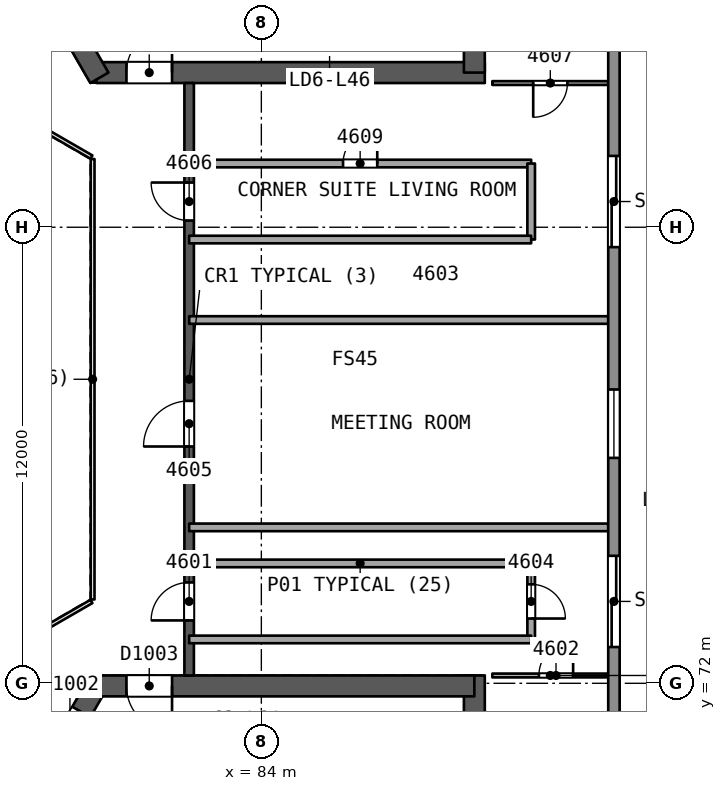
"""IFC4 building model, lengths in metres.
Left out: names, types, materials, properties, quantities, classifications, styles, units other than length and angle.
Written with IfcOpenShell. Run it as: python <this file> out.ifc"""

import sys

from ifc_helpers import new_model, si_unit, direction, frame, frame_2d, origin, place, context, subcontext, project, spatial, rectangle, extrude, element, fill, save


model = new_model("IFC4")
c1 = context("Model", 3, precision=1e-05, world=origin(), true_north=direction((0.0, 1.0)))
c2 = subcontext(c1, "Body", "Model", "MODEL_VIEW")
j1 = project(units=[si_unit("LENGTHUNIT", "METRE"), si_unit("PLANEANGLEUNIT", "RADIAN")], contexts=[c1])
p1 = place(None, origin())
s1 = spatial("IfcSite", under=j1, at=p1, CompositionType="ELEMENT")
p2 = place(p1, origin())
s2 = spatial("IfcBuilding", under=s1, at=p2, CompositionType="ELEMENT")
p3 = place(p2, frame((0.0, 0.0, 189.6)))
s3 = spatial("IfcBuildingStorey", under=s2, at=p3, CompositionType="ELEMENT", Elevation=189.6)
p4 = place(p3, frame((79.659, 88.069, 0.0), z_axis=(0.0, 0.0, 1.0), x_axis=(1.0, 0.0, 0.0)))
e1 = element("IfcWall", 1, at=p4, inside=s3, PredefinedType="SHEAR", context=c2, shape_type="SweptSolid", body=[
    extrude(rectangle(XDim=10.221, YDim=0.55, at=frame_2d((5.111, 0.0))), origin(), (0.0, 0.0, 1.0), 3.7),
])
p5 = place(p4, frame((0.791, 0.0, 0.0)))
e2 = element("IfcOpeningElement", 2, at=p5, cuts=e1, PredefinedType="OPENING", context=c2, shape_type="SweptSolid", body=[
    extrude(rectangle(XDim=1.2, YDim=2.1, at=frame_2d((0.6, 1.05))), frame((0.0, 0.286, 0.0), z_axis=(0.0, -1.0, 0.0), x_axis=(1.0, 0.0, 0.0)), (0.0, 0.0, 1.0), 0.571),
])
p6 = place(p3, frame((89.605, 88.069, 0.0), z_axis=(0.0, 0.0, 1.0), x_axis=(0.0, 1.0, 0.0)))
e3 = element("IfcWall", 3, at=p6, inside=s3, PredefinedType="SHEAR", context=c2, shape_type="SweptSolid", body=[
    extrude(rectangle(XDim=14.058, YDim=0.55, at=frame_2d((7.029, 0.0))), origin(), (0.0, 0.0, 1.0), 3.7),
])
p7 = place(p3, frame((74.686, 96.683, 0.0), z_axis=(0.0, 0.0, 1.0), x_axis=(0.499997818338, -0.866026663364, 0.0)))
e4 = element("IfcWall", 4, at=p7, inside=s3, PredefinedType="SHEAR", context=c2, shape_type="SweptSolid", body=[
    extrude(rectangle(XDim=10.105, YDim=0.55, at=frame_2d((5.052, 0.0))), origin(), (0.0, 0.0, 1.0), 3.7),
])
p8 = place(p7, frame((7.955, 0.0, 0.0)))
e5 = element("IfcOpeningElement", 5, at=p8, cuts=e4, PredefinedType="OPENING", context=c2, shape_type="SweptSolid", body=[
    extrude(rectangle(XDim=1.2, YDim=2.1, at=frame_2d((0.6, 1.05))), frame((0.0, 0.286, 0.0), z_axis=(0.0, -1.0, 0.0), x_axis=(1.0, 0.0, 0.0)), (0.0, 0.0, 1.0), 0.571),
])
p9 = place(p3, frame((79.659, 71.931, 0.0), z_axis=(0.0, 0.0, 1.0), x_axis=(-0.500000202252, -0.866025287014, 0.0)))
e6 = element("IfcWall", 6, at=p9, inside=s3, PredefinedType="SHEAR", context=c2, shape_type="SweptSolid", body=[
    extrude(rectangle(XDim=10.221, YDim=0.55, at=frame_2d((5.111, 0.0))), origin(), (0.0, 0.0, 1.0), 3.7),
])
p10 = place(p9, frame((0.791, 0.0, 0.0)))
e7 = element("IfcOpeningElement", 7, at=p10, cuts=e6, PredefinedType="OPENING", context=c2, shape_type="SweptSolid", body=[
    extrude(rectangle(XDim=1.2, YDim=2.1, at=frame_2d((0.6, 1.05))), frame((0.0, 0.286, 0.0), z_axis=(0.0, -1.0, 0.0), x_axis=(1.0, 0.0, 0.0)), (0.0, 0.0, 1.0), 0.571),
])
p11 = place(p3, frame((89.605, 58.031, 0.0), z_axis=(0.0, 0.0, 1.0), x_axis=(0.0, 1.0, 0.0)))
e8 = element("IfcWall", 8, at=p11, inside=s3, PredefinedType="SHEAR", context=c2, shape_type="SweptSolid", body=[
    extrude(rectangle(XDim=14.175, YDim=0.55, at=frame_2d((7.087, 0.0))), origin(), (0.0, 0.0, 1.0), 3.7),
])
p12 = place(p3, frame((89.605, 71.931, 0.0), z_axis=(0.0, 0.0, 1.0), x_axis=(-1.0, 0.0, 0.0)))
e9 = element("IfcWall", 9, at=p12, inside=s3, PredefinedType="SHEAR", context=c2, shape_type="SweptSolid", body=[
    extrude(rectangle(XDim=10.105, YDim=0.55, at=frame_2d((5.052, 0.0))), origin(), (0.0, 0.0, 1.0), 3.7),
])
p13 = place(p12, frame((7.955, 0.0, 0.0)))
e10 = element("IfcOpeningElement", 10, at=p13, cuts=e9, PredefinedType="OPENING", context=c2, shape_type="SweptSolid", body=[
    extrude(rectangle(XDim=1.2, YDim=2.1, at=frame_2d((0.6, 1.05))), frame((0.0, 0.286, 0.0), z_axis=(0.0, -1.0, 0.0), x_axis=(1.0, 0.0, 0.0)), (0.0, 0.0, 1.0), 0.571),
])
p14 = place(p3, frame((82.1, 72.206, 0.0), z_axis=(0.0, 0.0, 1.0), x_axis=(0.0, 1.0, 0.0)))
e11 = element("IfcWall", 11, at=p14, inside=s3, PredefinedType="SHEAR", context=c2, shape_type="SweptSolid", body=[
    extrude(rectangle(XDim=15.588, YDim=0.25, at=frame_2d((7.794, 0.0))), origin(), (0.0, 0.0, 1.0), 3.25),
])
p15 = place(p14, frame((1.448, 0.0, 0.0)))
e12 = element("IfcOpeningElement", 12, at=p15, cuts=e11, PredefinedType="OPENING", context=c2, shape_type="SweptSolid", body=[
    extrude(rectangle(XDim=1.0, YDim=2.1, at=frame_2d((0.5, 1.05))), frame((0.0, 0.135, 0.0), z_axis=(0.0, -1.0, 0.0), x_axis=(1.0, 0.0, 0.0)), (0.0, 0.0, 1.0), 0.271),
])
p16 = place(p14, frame((6.025, 0.0, 0.0)))
e13 = element("IfcOpeningElement", 13, at=p16, cuts=e11, PredefinedType="OPENING", context=c2, shape_type="SweptSolid", body=[
    extrude(rectangle(XDim=1.2, YDim=2.4, at=frame_2d((0.6, 1.2))), frame((0.0, 0.135, 0.0), z_axis=(0.0, -1.0, 0.0), x_axis=(1.0, 0.0, 0.0)), (0.0, 0.0, 1.0), 0.271),
])
p17 = place(p14, frame((11.971, 0.0, 0.0)))
e14 = element("IfcOpeningElement", 14, at=p17, cuts=e11, PredefinedType="OPENING", context=c2, shape_type="SweptSolid", body=[
    extrude(rectangle(XDim=1.0, YDim=2.1, at=frame_2d((0.5, 1.05))), frame((0.0, 0.135, 0.0), z_axis=(0.0, -1.0, 0.0), x_axis=(1.0, 0.0, 0.0)), (0.0, 0.0, 1.0), 0.271),
])
p18 = place(p3, frame((90.079, 72.206, 0.0), z_axis=(0.0, 0.0, 1.0), x_axis=(1.0, 0.0, 0.0)))
e15 = element("IfcWall", 15, at=p18, inside=s3, PredefinedType="PARTITIONING", context=c2, shape_type="SweptSolid", body=[
    extrude(rectangle(XDim=3.05, YDim=0.1, at=frame_2d((1.525, 0.0))), origin(), (0.0, 0.0, 1.0), 3.25),
])
p19 = place(p18, frame((1.225, 0.0, 0.0)))
e16 = element("IfcOpeningElement", 16, at=p19, cuts=e15, PredefinedType="OPENING", context=c2, shape_type="SweptSolid", body=[
    extrude(rectangle(XDim=0.9, YDim=2.1, at=frame_2d((0.45, 1.05))), frame((0.0, 0.061, 0.0), z_axis=(0.0, -1.0, 0.0), x_axis=(1.0, 0.0, 0.0)), (0.0, 0.0, 1.0), 0.121),
])
p20 = place(p3, frame((82.1, 75.154, 0.0), z_axis=(0.0, 0.0, 1.0), x_axis=(1.0, 0.0, 0.0)))
e17 = element("IfcWall", 17, at=p20, inside=s3, PredefinedType="PARTITIONING", context=c2, shape_type="SweptSolid", body=[
    extrude(rectangle(XDim=9.0, YDim=0.2, at=frame_2d((4.5, 0.0))), origin(), (0.0, 0.0, 1.0), 3.25),
])
p21 = place(p3, frame((91.1, 75.154, 0.0), z_axis=(0.0, 0.0, 1.0), x_axis=(0.0, -1.0, 0.0)))
e18 = element("IfcWall", 18, at=p21, inside=s3, PredefinedType="PARTITIONING", context=c2, shape_type="SweptSolid", body=[
    extrude(rectangle(XDim=2.0, YDim=0.2, at=frame_2d((1.0, 0.0))), origin(), (0.0, 0.0, 1.0), 3.25),
])
p22 = place(p21, frame((0.55, 0.0, 0.0)))
e19 = element("IfcOpeningElement", 19, at=p22, cuts=e18, PredefinedType="OPENING", context=c2, shape_type="SweptSolid", body=[
    extrude(rectangle(XDim=0.9, YDim=2.1, at=frame_2d((0.45, 1.05))), frame((0.0, 0.11, 0.0), z_axis=(0.0, -1.0, 0.0), x_axis=(1.0, 0.0, 0.0)), (0.0, 0.0, 1.0), 0.221),
])
p23 = place(p3, frame((91.1, 73.154, 0.0), z_axis=(0.0, 0.0, 1.0), x_axis=(-1.0, 0.0, 0.0)))
e20 = element("IfcWall", 20, at=p23, inside=s3, PredefinedType="PARTITIONING", context=c2, shape_type="SweptSolid", body=[
    extrude(rectangle(XDim=9.0, YDim=0.2, at=frame_2d((4.5, 0.0))), origin(), (0.0, 0.0, 1.0), 3.25),
])
for number, where, z_axis, x_axis in (
    (21, (93.129, 76.103, 0.0), (0.0, 0.0, 1.0), (-1.0, 0.0, 0.0)),
    (22, (93.129, 81.559, 0.0), (0.0, 0.0, 1.0), (-1.0, 0.0, 0.0)),
):
    element("IfcWall", number, at=place(p3, frame(where, z_axis=z_axis, x_axis=x_axis)), inside=s3, PredefinedType="PARTITIONING", context=c2, shape_type="SweptSolid", body=[
        extrude(rectangle(XDim=11.029, YDim=0.2, at=frame_2d((5.514, 0.0))), origin(), (0.0, 0.0, 1.0), 3.25),
    ])
p24 = place(p3, frame((93.129, 87.794, 0.0), z_axis=(0.0, 0.0, 1.0), x_axis=(-1.0, 0.0, 0.0)))
e23 = element("IfcWall", 23, at=p24, inside=s3, PredefinedType="PARTITIONING", context=c2, shape_type="SweptSolid", body=[
    extrude(rectangle(XDim=3.05, YDim=0.1, at=frame_2d((1.525, 0.0))), origin(), (0.0, 0.0, 1.0), 3.25),
])
p25 = place(p24, frame((1.075, 0.0, 0.0)))
e24 = element("IfcOpeningElement", 24, at=p25, cuts=e23, PredefinedType="OPENING", context=c2, shape_type="SweptSolid", body=[
    extrude(rectangle(XDim=0.9, YDim=2.1, at=frame_2d((0.45, 1.05))), frame((0.0, 0.061, 0.0), z_axis=(0.0, -1.0, 0.0), x_axis=(1.0, 0.0, 0.0)), (0.0, 0.0, 1.0), 0.121),
])
p26 = place(p3, frame((82.1, 85.677, 0.0), z_axis=(0.0, 0.0, 1.0), x_axis=(1.0, 0.0, 0.0)))
e25 = element("IfcWall", 25, at=p26, inside=s3, PredefinedType="PARTITIONING", context=c2, shape_type="SweptSolid", body=[
    extrude(rectangle(XDim=9.0, YDim=0.2, at=frame_2d((4.5, 0.0))), origin(), (0.0, 0.0, 1.0), 3.25),
])
p27 = place(p26, frame((4.05, 0.0, 0.0)))
e26 = element("IfcOpeningElement", 26, at=p27, cuts=e25, PredefinedType="OPENING", context=c2, shape_type="SweptSolid", body=[
    extrude(rectangle(XDim=0.9, YDim=2.1, at=frame_2d((0.45, 1.05))), frame((0.0, 0.11, 0.0), z_axis=(0.0, -1.0, 0.0), x_axis=(1.0, 0.0, 0.0)), (0.0, 0.0, 1.0), 0.221),
])
p28 = place(p3, frame((91.1, 85.677, 0.0), z_axis=(0.0, 0.0, 1.0), x_axis=(0.0, -1.0, 0.0)))
e27 = element("IfcWall", 27, at=p28, inside=s3, PredefinedType="PARTITIONING", context=c2, shape_type="SweptSolid", body=[
    extrude(rectangle(XDim=2.0, YDim=0.2, at=frame_2d((1.0, 0.0))), origin(), (0.0, 0.0, 1.0), 3.25),
])
p29 = place(p3, frame((91.1, 83.677, 0.0), z_axis=(0.0, 0.0, 1.0), x_axis=(-1.0, 0.0, 0.0)))
e28 = element("IfcWall", 28, at=p29, inside=s3, PredefinedType="PARTITIONING", context=c2, shape_type="SweptSolid", body=[
    extrude(rectangle(XDim=9.0, YDim=0.2, at=frame_2d((4.5, 0.0))), origin(), (0.0, 0.0, 1.0), 3.25),
])
p30 = place(p3, frame((93.278, 106.281, 0.0), z_axis=(0.0, 0.0, 1.0), x_axis=(0.0, -1.0, 0.0)))
e29 = element("IfcWall", 29, at=p30, inside=s3, PredefinedType="SOLIDWALL", context=c2, shape_type="SweptSolid", body=[
    extrude(rectangle(XDim=52.562, YDim=0.3, at=frame_2d((26.281, 0.0))), origin(), (0.0, 0.0, 1.0), 3.25),
])
p31 = place(p30, frame((30.926, 0.0, 0.0)))
e30 = element("IfcOpeningElement", 30, at=p31, cuts=e29, PredefinedType="OPENING", context=c2, shape_type="SweptSolid", body=[
    extrude(rectangle(XDim=2.4, YDim=2.4, at=frame_2d((1.2, 1.2))), frame((0.0, 0.161, 0.0), z_axis=(0.0, -1.0, 0.0), x_axis=(1.0, 0.0, 0.0)), (0.0, 0.0, 1.0), 0.321),
])
p32 = place(p30, frame((40.864, 0.0, 0.0)))
e31 = element("IfcOpeningElement", 31, at=p32, cuts=e29, PredefinedType="OPENING", context=c2, shape_type="SweptSolid", body=[
    extrude(rectangle(XDim=2.4, YDim=2.4, at=frame_2d((1.2, 1.2))), frame((0.0, 0.161, 0.0), z_axis=(0.0, -1.0, 0.0), x_axis=(1.0, 0.0, 0.0)), (0.0, 0.0, 1.0), 0.321),
])
p33 = place(p30, frame((20.404, 0.0, 0.0)))
e32 = element("IfcOpeningElement", 32, at=p33, cuts=e29, PredefinedType="OPENING", context=c2, shape_type="SweptSolid", body=[
    extrude(rectangle(XDim=2.4, YDim=2.4, at=frame_2d((1.2, 1.2))), frame((0.0, 0.161, 0.0), z_axis=(0.0, -1.0, 0.0), x_axis=(1.0, 0.0, 0.0)), (0.0, 0.0, 1.0), 0.321),
])
p34 = place(p30, frame((9.278, 0.0, 0.0)))
e33 = element("IfcOpeningElement", 33, at=p34, cuts=e29, PredefinedType="OPENING", context=c2, shape_type="SweptSolid", body=[
    extrude(rectangle(XDim=2.4, YDim=2.4, at=frame_2d((1.2, 1.2))), frame((0.0, 0.161, 0.0), z_axis=(0.0, -1.0, 0.0), x_axis=(1.0, 0.0, 0.0)), (0.0, 0.0, 1.0), 0.321),
])
p35 = place(p30, frame((26.55, 0.0, 0.9)))
e34 = element("IfcOpeningElement", 34, at=p35, cuts=e29, PredefinedType="OPENING", context=c2, shape_type="SweptSolid", body=[
    extrude(rectangle(XDim=1.8, YDim=1.5, at=frame_2d((0.9, 0.75))), frame((0.0, 0.161, 0.0), z_axis=(0.0, -1.0, 0.0), x_axis=(1.0, 0.0, 0.0)), (0.0, 0.0, 1.0), 0.321),
])
p36 = place(p3, frame((43.101, 82.689, 0.0), z_axis=(0.0, 0.0, 1.0), x_axis=(0.866025007541, 0.500000686313, 0.0)))
e35 = element("IfcWall", 35, at=p36, inside=s3, PredefinedType="SOLIDWALL", context=c2, shape_type="SweptSolid", body=[
    extrude(rectangle(XDim=52.562, YDim=0.3, at=frame_2d((26.281, 0.0))), origin(), (0.0, 0.0, 1.0), 3.25),
])
p37 = place(p36, frame((31.316, 0.0, 0.0)))
e36 = element("IfcOpeningElement", 36, at=p37, cuts=e35, PredefinedType="OPENING", context=c2, shape_type="SweptSolid", body=[
    extrude(rectangle(XDim=2.4, YDim=2.4, at=frame_2d((1.2, 1.2))), frame((0.0, 0.161, 0.0), z_axis=(0.0, -1.0, 0.0), x_axis=(1.0, 0.0, 0.0)), (0.0, 0.0, 1.0), 0.321),
])
p38 = place(p36, frame((40.864, 0.0, 0.0)))
e37 = element("IfcOpeningElement", 37, at=p38, cuts=e35, PredefinedType="OPENING", context=c2, shape_type="SweptSolid", body=[
    extrude(rectangle(XDim=2.4, YDim=2.4, at=frame_2d((1.2, 1.2))), frame((0.0, 0.161, 0.0), z_axis=(0.0, -1.0, 0.0), x_axis=(1.0, 0.0, 0.0)), (0.0, 0.0, 1.0), 0.321),
])
p39 = place(p36, frame((19.625, 0.0, 0.0)))
e38 = element("IfcOpeningElement", 38, at=p39, cuts=e35, PredefinedType="OPENING", context=c2, shape_type="SweptSolid", body=[
    extrude(rectangle(XDim=2.4, YDim=2.4, at=frame_2d((1.2, 1.2))), frame((0.0, 0.161, 0.0), z_axis=(0.0, -1.0, 0.0), x_axis=(1.0, 0.0, 0.0)), (0.0, 0.0, 1.0), 0.321),
])
p40 = place(p36, frame((9.277, 0.0, 0.0)))
e39 = element("IfcOpeningElement", 39, at=p40, cuts=e35, PredefinedType="OPENING", context=c2, shape_type="SweptSolid", body=[
    extrude(rectangle(XDim=2.4, YDim=2.4, at=frame_2d((1.2, 1.2))), frame((0.0, 0.161, 0.0), z_axis=(0.0, -1.0, 0.0), x_axis=(1.0, 0.0, 0.0)), (0.0, 0.0, 1.0), 0.321),
])
p41 = place(p36, frame((28.109, 0.0, 0.9)))
e40 = element("IfcOpeningElement", 40, at=p41, cuts=e35, PredefinedType="OPENING", context=c2, shape_type="SweptSolid", body=[
    extrude(rectangle(XDim=1.8, YDim=1.5, at=frame_2d((0.9, 0.75))), frame((0.0, 0.161, 0.0), z_axis=(0.0, -1.0, 0.0), x_axis=(1.0, 0.0, 0.0)), (0.0, 0.0, 1.0), 0.321),
])
p42 = place(p36, frame((24.212, 0.0, 0.9)))
e41 = element("IfcOpeningElement", 41, at=p42, cuts=e35, PredefinedType="OPENING", context=c2, shape_type="SweptSolid", body=[
    extrude(rectangle(XDim=1.8, YDim=1.5, at=frame_2d((0.9, 0.75))), frame((0.0, 0.161, 0.0), z_axis=(0.0, -1.0, 0.0), x_axis=(1.0, 0.0, 0.0)), (0.0, 0.0, 1.0), 0.321),
])
p43 = place(p3, frame((88.621, 51.031, 0.0), z_axis=(0.0, 0.0, 1.0), x_axis=(-0.866025007541, 0.500000686313, 0.0)))
e42 = element("IfcWall", 42, at=p43, inside=s3, PredefinedType="SOLIDWALL", context=c2, shape_type="SweptSolid", body=[
    extrude(rectangle(XDim=52.562, YDim=0.3, at=frame_2d((26.281, 0.0))), origin(), (0.0, 0.0, 1.0), 3.25),
])
p44 = place(p43, frame((29.367, 0.0, 0.0)))
e43 = element("IfcOpeningElement", 43, at=p44, cuts=e42, PredefinedType="OPENING", context=c2, shape_type="SweptSolid", body=[
    extrude(rectangle(XDim=2.4, YDim=2.4, at=frame_2d((1.2, 1.2))), frame((0.0, 0.161, 0.0), z_axis=(0.0, -1.0, 0.0), x_axis=(1.0, 0.0, 0.0)), (0.0, 0.0, 1.0), 0.321),
])
p45 = place(p43, frame((40.864, 0.0, 0.0)))
e44 = element("IfcOpeningElement", 44, at=p45, cuts=e42, PredefinedType="OPENING", context=c2, shape_type="SweptSolid", body=[
    extrude(rectangle(XDim=2.4, YDim=2.4, at=frame_2d((1.2, 1.2))), frame((0.0, 0.161, 0.0), z_axis=(0.0, -1.0, 0.0), x_axis=(1.0, 0.0, 0.0)), (0.0, 0.0, 1.0), 0.321),
])
p46 = place(p43, frame((19.625, 0.0, 0.0)))
e45 = element("IfcOpeningElement", 45, at=p46, cuts=e42, PredefinedType="OPENING", context=c2, shape_type="SweptSolid", body=[
    extrude(rectangle(XDim=2.4, YDim=2.4, at=frame_2d((1.2, 1.2))), frame((0.0, 0.161, 0.0), z_axis=(0.0, -1.0, 0.0), x_axis=(1.0, 0.0, 0.0)), (0.0, 0.0, 1.0), 0.321),
])
p47 = place(p43, frame((9.277, 0.0, 0.0)))
e46 = element("IfcOpeningElement", 46, at=p47, cuts=e42, PredefinedType="OPENING", context=c2, shape_type="SweptSolid", body=[
    extrude(rectangle(XDim=2.4, YDim=2.4, at=frame_2d((1.2, 1.2))), frame((0.0, 0.161, 0.0), z_axis=(0.0, -1.0, 0.0), x_axis=(1.0, 0.0, 0.0)), (0.0, 0.0, 1.0), 0.321),
])
p48 = place(p43, frame((24.212, 0.0, 0.9)))
e47 = element("IfcOpeningElement", 47, at=p48, cuts=e42, PredefinedType="OPENING", context=c2, shape_type="SweptSolid", body=[
    extrude(rectangle(XDim=1.8, YDim=1.5, at=frame_2d((0.9, 0.75))), frame((0.0, 0.161, 0.0), z_axis=(0.0, -1.0, 0.0), x_axis=(1.0, 0.0, 0.0)), (0.0, 0.0, 1.0), 0.321),
])
p49 = place(p3, frame((79.56, 74.206, 0.0), z_axis=(0.0, 0.0, 1.0), x_axis=(0.0, 1.0, 0.0)))
e48 = element("IfcWall", 48, at=p49, inside=s3, PredefinedType="PARTITIONING", context=c2, shape_type="SweptSolid", body=[
    extrude(rectangle(XDim=11.588, YDim=0.1, at=frame_2d((5.794, 0.0))), origin(), (0.0, 0.0, 1.0), 3.25),
])
for number, where, z_axis, x_axis in (
    (49, (79.53, 85.846, 0.0), (0.0, 0.0, 1.0), (-0.866, 0.5, 0.0)),
    (50, (77.798, 73.154, 0.0), (0.0, 0.0, 1.0), (0.866, 0.5, 0.0)),
):
    element("IfcWall", number, at=place(p3, frame(where, z_axis=z_axis, x_axis=x_axis)), inside=s3, PredefinedType="PARTITIONING", context=c2, shape_type="SweptSolid", body=[
        extrude(rectangle(XDim=2.0, YDim=0.1, at=frame_2d((1.0, 0.0))), origin(), (0.0, 0.0, 1.0), 3.25),
    ])
p50 = place(p15, origin())
e51 = element("IfcDoor", 51, at=p50, inside=s3, OperationType="SINGLE_SWING_LEFT", PredefinedType="NOTDEFINED", context=c2, shape_type="SweptSolid", body=[
    extrude(rectangle(XDim=1.0, YDim=2.1, at=frame_2d((0.5, 1.05))), frame((0.0, 0.025, 0.0), z_axis=(0.0, -1.0, 0.0), x_axis=(1.0, 0.0, 0.0)), (0.0, 0.0, 1.0), 0.05),
])
fill(e12, e51)
p51 = place(p19, origin())
e52 = element("IfcDoor", 52, at=p51, inside=s3, OperationType="SINGLE_SWING_RIGHT", PredefinedType="NOTDEFINED", context=c2, shape_type="SweptSolid", body=[
    extrude(rectangle(XDim=0.9, YDim=2.1, at=frame_2d((0.45, 1.05))), frame((0.0, 0.025, 0.0), z_axis=(0.0, -1.0, 0.0), x_axis=(1.0, 0.0, 0.0)), (0.0, 0.0, 1.0), 0.05),
])
fill(e16, e52)
p52 = place(p22, origin())
e53 = element("IfcDoor", 53, at=p52, inside=s3, OperationType="SINGLE_SWING_RIGHT", PredefinedType="NOTDEFINED", context=c2, shape_type="SweptSolid", body=[
    extrude(rectangle(XDim=0.9, YDim=2.1, at=frame_2d((0.45, 1.05))), frame((0.0, 0.025, 0.0), z_axis=(0.0, -1.0, 0.0), x_axis=(1.0, 0.0, 0.0)), (0.0, 0.0, 1.0), 0.05),
])
fill(e19, e53)
p53 = place(p16, origin())
e54 = element("IfcDoor", 54, at=p53, inside=s3, OperationType="SINGLE_SWING_LEFT", PredefinedType="NOTDEFINED", context=c2, shape_type="SweptSolid", body=[
    extrude(rectangle(XDim=1.2, YDim=2.4, at=frame_2d((0.6, 1.2))), frame((0.0, 0.025, 0.0), z_axis=(0.0, -1.0, 0.0), x_axis=(1.0, 0.0, 0.0)), (0.0, 0.0, 1.0), 0.05),
])
fill(e13, e54)
p54 = place(p17, origin())
e55 = element("IfcDoor", 55, at=p54, inside=s3, OperationType="SINGLE_SWING_RIGHT", PredefinedType="NOTDEFINED", context=c2, shape_type="SweptSolid", body=[
    extrude(rectangle(XDim=1.0, YDim=2.1, at=frame_2d((0.5, 1.05))), frame((0.0, 0.025, 0.0), z_axis=(0.0, -1.0, 0.0), x_axis=(1.0, 0.0, 0.0)), (0.0, 0.0, 1.0), 0.05),
])
fill(e14, e55)
p55 = place(p25, origin())
e56 = element("IfcDoor", 56, at=p55, inside=s3, OperationType="SINGLE_SWING_RIGHT", PredefinedType="NOTDEFINED", context=c2, shape_type="SweptSolid", body=[
    extrude(rectangle(XDim=0.9, YDim=2.1, at=frame_2d((0.45, 1.05))), frame((0.0, 0.025, 0.0), z_axis=(0.0, -1.0, 0.0), x_axis=(1.0, 0.0, 0.0)), (0.0, 0.0, 1.0), 0.05),
])
fill(e24, e56)
p56 = place(p27, origin())
e57 = element("IfcDoor", 57, at=p56, inside=s3, OperationType="SINGLE_SWING_RIGHT", PredefinedType="NOTDEFINED", context=c2, shape_type="SweptSolid", body=[
    extrude(rectangle(XDim=0.9, YDim=2.1, at=frame_2d((0.45, 1.05))), frame((0.0, 0.025, 0.0), z_axis=(0.0, -1.0, 0.0), x_axis=(1.0, 0.0, 0.0)), (0.0, 0.0, 1.0), 0.05),
])
fill(e26, e57)
p57 = place(p31, origin())
e58 = element("IfcDoor", 58, at=p57, inside=s3, OperationType="SLIDING_TO_LEFT", PredefinedType="NOTDEFINED", context=c2, shape_type="SweptSolid", body=[
    extrude(rectangle(XDim=2.4, YDim=2.4, at=frame_2d((1.2, 1.2))), frame((0.0, 0.025, 0.0), z_axis=(0.0, -1.0, 0.0), x_axis=(1.0, 0.0, 0.0)), (0.0, 0.0, 1.0), 0.05),
])
fill(e30, e58)
p58 = place(p33, origin())
e59 = element("IfcDoor", 59, at=p58, inside=s3, OperationType="SLIDING_TO_LEFT", PredefinedType="NOTDEFINED", context=c2, shape_type="SweptSolid", body=[
    extrude(rectangle(XDim=2.4, YDim=2.4, at=frame_2d((1.2, 1.2))), frame((0.0, 0.025, 0.0), z_axis=(0.0, -1.0, 0.0), x_axis=(1.0, 0.0, 0.0)), (0.0, 0.0, 1.0), 0.05),
])
fill(e32, e59)
p59 = place(p35, origin())
e60 = element("IfcWindow", 60, at=p59, inside=s3, PartitioningType="SINGLE_PANEL", PredefinedType="WINDOW", context=c2, shape_type="SweptSolid", body=[
    extrude(rectangle(XDim=1.8, YDim=1.5, at=frame_2d((0.9, 0.75))), frame((0.0, 0.03, 0.0), z_axis=(0.0, -1.0, 0.0), x_axis=(1.0, 0.0, 0.0)), (0.0, 0.0, 1.0), 0.06),
])
fill(e34, e60)
p60 = place(p5, origin())
e61 = element("IfcDoor", 61, at=p60, inside=s3, OperationType="SINGLE_SWING_RIGHT", PredefinedType="NOTDEFINED", context=c2, shape_type="SweptSolid", body=[
    extrude(rectangle(XDim=1.2, YDim=2.1, at=frame_2d((0.6, 1.05))), frame((0.0, 0.025, 0.0), z_axis=(0.0, -1.0, 0.0), x_axis=(1.0, 0.0, 0.0)), (0.0, 0.0, 1.0), 0.05),
])
fill(e2, e61)
p61 = place(p10, origin())
e62 = element("IfcDoor", 62, at=p61, inside=s3, OperationType="SINGLE_SWING_RIGHT", PredefinedType="NOTDEFINED", context=c2, shape_type="SweptSolid", body=[
    extrude(rectangle(XDim=1.2, YDim=2.1, at=frame_2d((0.6, 1.05))), frame((0.0, 0.025, 0.0), z_axis=(0.0, -1.0, 0.0), x_axis=(1.0, 0.0, 0.0)), (0.0, 0.0, 1.0), 0.05),
])
fill(e7, e62)
p62 = place(p13, origin())
e63 = element("IfcDoor", 63, at=p62, inside=s3, OperationType="SINGLE_SWING_LEFT", PredefinedType="NOTDEFINED", context=c2, shape_type="SweptSolid", body=[
    extrude(rectangle(XDim=1.2, YDim=2.1, at=frame_2d((0.6, 1.05))), frame((0.0, 0.025, 0.0), z_axis=(0.0, -1.0, 0.0), x_axis=(1.0, 0.0, 0.0)), (0.0, 0.0, 1.0), 0.05),
])
fill(e10, e63)
save(model, sys.argv[1])
